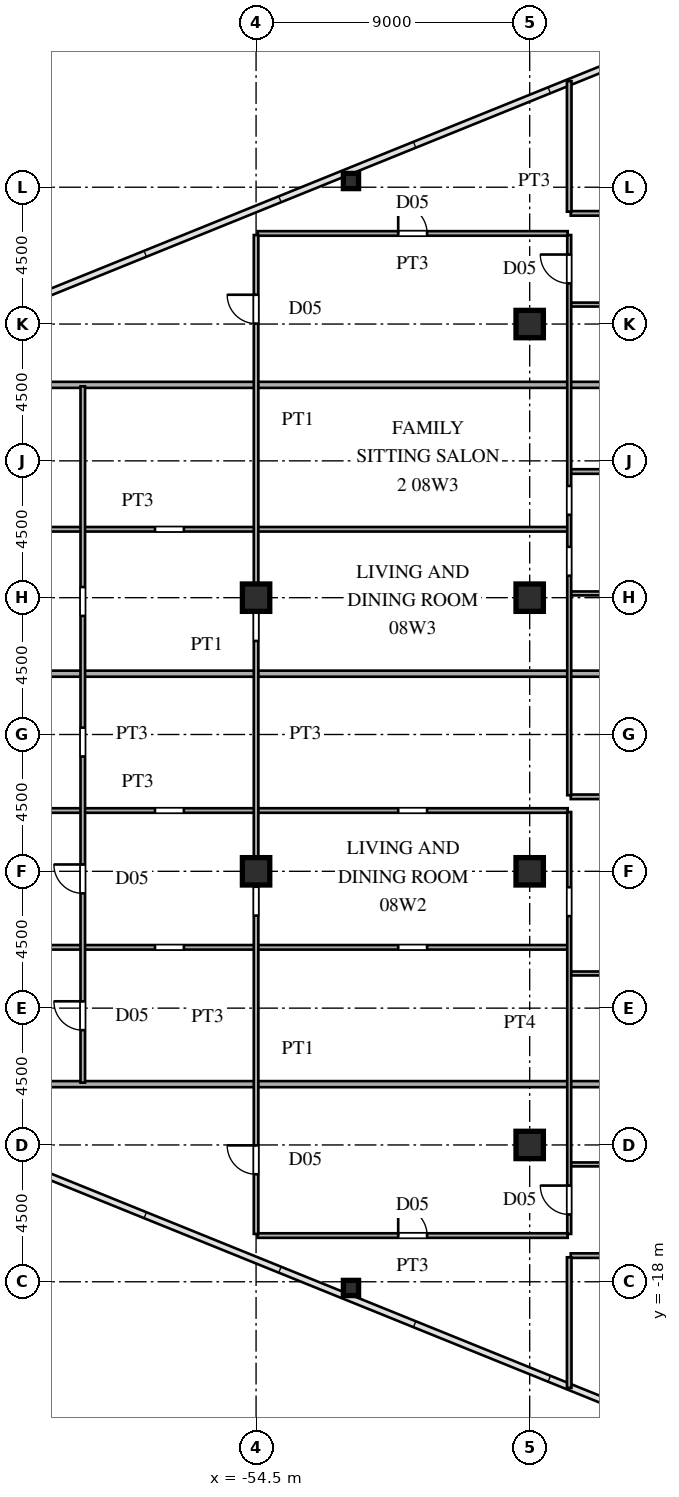
"""IFC4 building model, lengths in metres.
Left out: names, types, materials, properties, quantities, classifications, styles, units other than length and angle.
Written with IfcOpenShell. Run it as: python <this file> out.ifc"""

import sys

from ifc_helpers import new_model, si_unit, direction, frame, frame_2d, origin, origin_2d, place, context, subcontext, project, spatial, rectangle, hollow_rectangle, i_section, extrude, source, transform, mapped, element, fill, save


model = new_model("IFC4")
c1 = context("Model", 3, precision=1e-05, world=origin(), true_north=direction((0.0, 1.0)))
c2 = subcontext(c1, "Body", "Model", "MODEL_VIEW")
j1 = project(units=[si_unit("LENGTHUNIT", "METRE"), si_unit("PLANEANGLEUNIT", "RADIAN")], contexts=[c1])
p1 = place(None, origin())
s1 = spatial("IfcSite", under=j1, at=p1, CompositionType="ELEMENT")
p2 = place(p1, origin())
s2 = spatial("IfcBuilding", under=s1, at=p2, CompositionType="ELEMENT")
p3 = place(p2, frame((0.0, 0.0, 33.3)))
s3 = spatial("IfcBuildingStorey", under=s2, at=p3, CompositionType="ELEMENT", Elevation=33.3)
m1 = source(origin(), c2, "Body", "SweptSolid", [
    extrude(i_section(OverallWidth=0.9, OverallDepth=0.9, WebThickness=0.036, FlangeThickness=0.055, at=origin_2d()), origin(), (0.0, 0.0, 1.0), 3.6),
])
for number, where, z_axis, x_axis in (
    (1, (-45.5, -13.5, 0.0), (0.0, 0.0, 1.0), (1.0, 0.0, 0.0)),
    (2, (-45.5, -4.5, 0.0), (0.0, 0.0, 1.0), (1.0, 0.0, 0.0)),
    (3, (-45.5, 4.5, 0.0), (0.0, 0.0, 1.0), (1.0, 0.0, 0.0)),
    (4, (-45.5, 13.5, 0.0), (0.0, 0.0, 1.0), (1.0, 0.0, 0.0)),
    (5, (-54.5, -4.5, 0.0), (0.0, 0.0, 1.0), (1.0, 0.0, 0.0)),
    (6, (-54.5, 4.5, 0.0), (0.0, 0.0, 1.0), (1.0, 0.0, 0.0)),
):
    element("IfcColumn", number, at=place(p3, frame(where, z_axis=z_axis, x_axis=x_axis)), inside=s3, PredefinedType="COLUMN", context=c2, shape_type="MappedRepresentation", body=[
        mapped(m1, transform((0.0, 0.0, 0.0), scale=1.0)),
    ])
m2 = source(origin(), c2, "Body", "SweptSolid", [
    extrude(hollow_rectangle(XDim=0.5, YDim=0.5, WallThickness=0.02, at=origin_2d()), origin(), (0.0, 0.0, 1.0), 3.6),
])
for number, where, z_axis, x_axis in (
    (7, (-51.378, -18.204, 0.0), (0.0, 0.0, 1.0), (1.0, 0.0, 0.0)),
    (8, (-51.378, 18.204, 0.0), (0.0, 0.0, 1.0), (1.0, 0.0, 0.0)),
):
    element("IfcColumn", number, at=place(p3, frame(where, z_axis=z_axis, x_axis=x_axis)), inside=s3, PredefinedType="COLUMN", context=c2, shape_type="MappedRepresentation", body=[
        mapped(m2, transform((0.0, 0.0, 0.0), scale=1.0)),
    ])
p4 = place(p3, frame((-44.15, -17.14, 0.0), z_axis=(0.0, 0.0, 1.0), x_axis=(1.0, 0.0, 0.0)))
e9 = element("IfcWall", 9, at=p4, inside=s3, PredefinedType="PARTITIONING", context=c2, shape_type="SweptSolid", body=[
    extrude(rectangle(XDim=4.5, YDim=0.15, at=frame_2d((2.25, 0.0))), origin(), (0.0, 0.0, 1.0), 3.38),
])
p5 = place(p4, frame((1.775, 0.0, 0.0)))
e10 = element("IfcOpeningElement", 10, at=p5, cuts=e9, PredefinedType="OPENING", context=c2, shape_type="SweptSolid", body=[
    extrude(rectangle(XDim=0.95, YDim=2.15, at=frame_2d((0.475, 1.075))), frame((0.0, 0.085, 0.0), z_axis=(0.0, -1.0, 0.0), x_axis=(1.0, 0.0, 0.0)), (0.0, 0.0, 1.0), 0.17),
])
p6 = place(p3, frame((-54.45, -16.48, 0.0), z_axis=(0.0, 0.0, 1.0), x_axis=(1.0, 0.0, 0.0)))
e11 = element("IfcWall", 11, at=p6, inside=s3, PredefinedType="PARTITIONING", context=c2, shape_type="SweptSolid", body=[
    extrude(rectangle(XDim=10.2, YDim=0.15, at=frame_2d((5.1, 0.0))), origin(), (0.0, 0.0, 1.0), 3.38),
])
p7 = place(p6, frame((4.625, 0.0, 0.0)))
e12 = element("IfcOpeningElement", 12, at=p7, cuts=e11, PredefinedType="OPENING", context=c2, shape_type="SweptSolid", body=[
    extrude(rectangle(XDim=0.95, YDim=2.15, at=frame_2d((0.475, 1.075))), frame((0.0, 0.085, 0.0), z_axis=(0.0, -1.0, 0.0), x_axis=(1.0, 0.0, 0.0)), (0.0, 0.0, 1.0), 0.17),
])
p8 = place(p3, frame((-44.15, -14.14, 0.0), z_axis=(0.0, 0.0, 1.0), x_axis=(1.0, 0.0, 0.0)))
e13 = element("IfcWall", 13, at=p8, inside=s3, PredefinedType="PARTITIONING", context=c2, shape_type="SweptSolid", body=[
    extrude(rectangle(XDim=4.45, YDim=0.13, at=frame_2d((2.225, 0.0))), origin(), (0.0, 0.0, 1.0), 3.38),
])
p9 = place(p8, frame((1.785, 0.0, 0.0)))
e14 = element("IfcOpeningElement", 14, at=p9, cuts=e13, PredefinedType="OPENING", context=c2, shape_type="SweptSolid", body=[
    extrude(rectangle(XDim=0.88, YDim=2.1, at=frame_2d((0.44, 1.05))), frame((0.0, 0.075, 0.0), z_axis=(0.0, -1.0, 0.0), x_axis=(1.0, 0.0, 0.0)), (0.0, 0.0, 1.0), 0.15),
])
p10 = place(p3, frame((-68.807, -11.5, 0.0), z_axis=(0.0, 0.0, 1.0), x_axis=(1.0, 0.0, 0.0)))
e15 = element("IfcWall", 15, at=p10, inside=s3, PredefinedType="PARTITIONING", context=c2, shape_type="SweptSolid", body=[
    extrude(rectangle(XDim=29.077, YDim=0.2, at=frame_2d((14.539, 0.0))), origin(), (0.0, 0.0, 1.0), 3.38),
])
p11 = place(p3, frame((-44.15, -7.86, 0.0), z_axis=(0.0, 0.0, 1.0), x_axis=(1.0, 0.0, 0.0)))
e16 = element("IfcWall", 16, at=p11, inside=s3, PredefinedType="PARTITIONING", context=c2, shape_type="SweptSolid", body=[
    extrude(rectangle(XDim=4.45, YDim=0.13, at=frame_2d((2.225, 0.0))), origin(), (0.0, 0.0, 1.0), 3.38),
])
p12 = place(p11, frame((1.785, 0.0, 0.0)))
e17 = element("IfcOpeningElement", 17, at=p12, cuts=e16, PredefinedType="OPENING", context=c2, shape_type="SweptSolid", body=[
    extrude(rectangle(XDim=0.88, YDim=2.1, at=frame_2d((0.44, 1.05))), frame((0.0, 0.075, 0.0), z_axis=(0.0, -1.0, 0.0), x_axis=(1.0, 0.0, 0.0)), (0.0, 0.0, 1.0), 0.15),
])
p13 = place(p3, frame((-72.535, -7.0, 0.0), z_axis=(0.0, 0.0, 1.0), x_axis=(1.0, 0.0, 0.0)))
e18 = element("IfcWall", 18, at=p13, inside=s3, PredefinedType="PARTITIONING", context=c2, shape_type="SweptSolid", body=[
    extrude(rectangle(XDim=28.285, YDim=0.15, at=frame_2d((14.143, 0.0))), origin(), (0.0, 0.0, 1.0), 3.38),
])
p14 = place(p13, frame((22.71, 0.0, 0.0)))
e19 = element("IfcOpeningElement", 19, at=p14, cuts=e18, PredefinedType="OPENING", context=c2, shape_type="SweptSolid", body=[
    extrude(rectangle(XDim=0.95, YDim=2.15, at=frame_2d((0.475, 1.075))), frame((0.0, 0.085, 0.0), z_axis=(0.0, -1.0, 0.0), x_axis=(1.0, 0.0, 0.0)), (0.0, 0.0, 1.0), 0.17),
])
p15 = place(p13, frame((14.71, 0.0, 0.0)))
e20 = element("IfcOpeningElement", 20, at=p15, cuts=e18, PredefinedType="OPENING", context=c2, shape_type="SweptSolid", body=[
    extrude(rectangle(XDim=0.95, YDim=2.15, at=frame_2d((0.475, 1.075))), frame((0.0, 0.085, 0.0), z_axis=(0.0, -1.0, 0.0), x_axis=(1.0, 0.0, 0.0)), (0.0, 0.0, 1.0), 0.17),
])
p16 = place(p3, frame((-72.535, -2.5, 0.0), z_axis=(0.0, 0.0, 1.0), x_axis=(1.0, 0.0, 0.0)))
e21 = element("IfcWall", 21, at=p16, inside=s3, PredefinedType="PARTITIONING", context=c2, shape_type="SweptSolid", body=[
    extrude(rectangle(XDim=28.285, YDim=0.15, at=frame_2d((14.143, 0.0))), origin(), (0.0, 0.0, 1.0), 3.38),
])
p17 = place(p16, frame((22.71, 0.0, 0.0)))
e22 = element("IfcOpeningElement", 22, at=p17, cuts=e21, PredefinedType="OPENING", context=c2, shape_type="SweptSolid", body=[
    extrude(rectangle(XDim=0.95, YDim=2.15, at=frame_2d((0.475, 1.075))), frame((0.0, 0.085, 0.0), z_axis=(0.0, -1.0, 0.0), x_axis=(1.0, 0.0, 0.0)), (0.0, 0.0, 1.0), 0.17),
])
p18 = place(p16, frame((14.71, 0.0, 0.0)))
e23 = element("IfcOpeningElement", 23, at=p18, cuts=e21, PredefinedType="OPENING", context=c2, shape_type="SweptSolid", body=[
    extrude(rectangle(XDim=0.95, YDim=2.15, at=frame_2d((0.475, 1.075))), frame((0.0, 0.085, 0.0), z_axis=(0.0, -1.0, 0.0), x_axis=(1.0, 0.0, 0.0)), (0.0, 0.0, 1.0), 0.17),
])
p19 = place(p3, frame((-44.15, -2.05, 0.0), z_axis=(0.0, 0.0, 1.0), x_axis=(1.0, 0.0, 0.0)))
e24 = element("IfcWall", 24, at=p19, inside=s3, PredefinedType="PARTITIONING", context=c2, shape_type="SweptSolid", body=[
    extrude(rectangle(XDim=4.45, YDim=0.15, at=frame_2d((2.225, 0.0))), origin(), (0.0, 0.0, 1.0), 3.38),
])
p20 = place(p19, frame((1.75, 0.0, 0.0)))
e25 = element("IfcOpeningElement", 25, at=p20, cuts=e24, PredefinedType="OPENING", context=c2, shape_type="SweptSolid", body=[
    extrude(rectangle(XDim=0.95, YDim=2.15, at=frame_2d((0.475, 1.075))), frame((0.0, 0.085, 0.0), z_axis=(0.0, -1.0, 0.0), x_axis=(1.0, 0.0, 0.0)), (0.0, 0.0, 1.0), 0.17),
])
p21 = place(p3, frame((-72.505, 2.0, 0.0), z_axis=(0.0, 0.0, 1.0), x_axis=(1.0, 0.0, 0.0)))
e26 = element("IfcWall", 26, at=p21, inside=s3, PredefinedType="PARTITIONING", context=c2, shape_type="SweptSolid", body=[
    extrude(rectangle(XDim=32.775, YDim=0.2, at=frame_2d((16.387, 0.0))), origin(), (0.0, 0.0, 1.0), 3.38),
])
p22 = place(p3, frame((-44.15, 4.64, 0.0), z_axis=(0.0, 0.0, 1.0), x_axis=(1.0, 0.0, 0.0)))
e27 = element("IfcWall", 27, at=p22, inside=s3, PredefinedType="PARTITIONING", context=c2, shape_type="SweptSolid", body=[
    extrude(rectangle(XDim=4.45, YDim=0.13, at=frame_2d((2.225, 0.0))), origin(), (0.0, 0.0, 1.0), 2.68),
])
p23 = place(p22, frame((1.785, 0.0, 0.0)))
e28 = element("IfcOpeningElement", 28, at=p23, cuts=e27, PredefinedType="OPENING", context=c2, shape_type="SweptSolid", body=[
    extrude(rectangle(XDim=0.88, YDim=2.1, at=frame_2d((0.44, 1.05))), frame((0.0, 0.075, 0.0), z_axis=(0.0, -1.0, 0.0), x_axis=(1.0, 0.0, 0.0)), (0.0, 0.0, 1.0), 0.15),
])
p24 = place(p3, frame((-72.535, 6.75, 0.0), z_axis=(0.0, 0.0, 1.0), x_axis=(1.0, 0.0, 0.0)))
e29 = element("IfcWall", 29, at=p24, inside=s3, PredefinedType="PARTITIONING", context=c2, shape_type="SweptSolid", body=[
    extrude(rectangle(XDim=28.285, YDim=0.15, at=frame_2d((14.143, 0.0))), origin(), (0.0, 0.0, 1.0), 3.38),
])
p25 = place(p24, frame((5.71, 0.0, 0.0)))
e30 = element("IfcOpeningElement", 30, at=p25, cuts=e29, PredefinedType="OPENING", context=c2, shape_type="SweptSolid", body=[
    extrude(rectangle(XDim=0.95, YDim=2.15, at=frame_2d((0.475, 1.075))), frame((0.0, 0.085, 0.0), z_axis=(0.0, -1.0, 0.0), x_axis=(1.0, 0.0, 0.0)), (0.0, 0.0, 1.0), 0.17),
])
p26 = place(p24, frame((14.71, 0.0, 0.0)))
e31 = element("IfcOpeningElement", 31, at=p26, cuts=e29, PredefinedType="OPENING", context=c2, shape_type="SweptSolid", body=[
    extrude(rectangle(XDim=0.95, YDim=2.15, at=frame_2d((0.475, 1.075))), frame((0.0, 0.085, 0.0), z_axis=(0.0, -1.0, 0.0), x_axis=(1.0, 0.0, 0.0)), (0.0, 0.0, 1.0), 0.17),
])
p27 = place(p3, frame((-44.15, 8.65, 0.0), z_axis=(0.0, 0.0, 1.0), x_axis=(1.0, 0.0, 0.0)))
e32 = element("IfcWall", 32, at=p27, inside=s3, PredefinedType="PARTITIONING", context=c2, shape_type="SweptSolid", body=[
    extrude(rectangle(XDim=4.45, YDim=0.15, at=frame_2d((2.225, 0.0))), origin(), (0.0, 0.0, 1.0), 3.38),
])
p28 = place(p27, frame((1.75, 0.0, 0.0)))
e33 = element("IfcOpeningElement", 33, at=p28, cuts=e32, PredefinedType="OPENING", context=c2, shape_type="SweptSolid", body=[
    extrude(rectangle(XDim=0.95, YDim=2.15, at=frame_2d((0.475, 1.075))), frame((0.0, 0.085, 0.0), z_axis=(0.0, -1.0, 0.0), x_axis=(1.0, 0.0, 0.0)), (0.0, 0.0, 1.0), 0.17),
])
p29 = place(p3, frame((-68.807, 11.5, 0.0), z_axis=(0.0, 0.0, 1.0), x_axis=(1.0, 0.0, 0.0)))
e34 = element("IfcWall", 34, at=p29, inside=s3, PredefinedType="PARTITIONING", context=c2, shape_type="SweptSolid", body=[
    extrude(rectangle(XDim=29.077, YDim=0.2, at=frame_2d((14.539, 0.0))), origin(), (0.0, 0.0, 1.0), 3.38),
])
p30 = place(p3, frame((-44.15, 14.14, 0.0), z_axis=(0.0, 0.0, 1.0), x_axis=(1.0, 0.0, 0.0)))
e35 = element("IfcWall", 35, at=p30, inside=s3, PredefinedType="PARTITIONING", context=c2, shape_type="SweptSolid", body=[
    extrude(rectangle(XDim=4.45, YDim=0.13, at=frame_2d((2.225, 0.0))), origin(), (0.0, 0.0, 1.0), 3.38),
])
p31 = place(p30, frame((1.785, 0.0, 0.0)))
e36 = element("IfcOpeningElement", 36, at=p31, cuts=e35, PredefinedType="OPENING", context=c2, shape_type="SweptSolid", body=[
    extrude(rectangle(XDim=0.88, YDim=2.1, at=frame_2d((0.44, 1.05))), frame((0.0, 0.075, 0.0), z_axis=(0.0, -1.0, 0.0), x_axis=(1.0, 0.0, 0.0)), (0.0, 0.0, 1.0), 0.15),
])
p32 = place(p3, frame((-54.45, 16.48, 0.0), z_axis=(0.0, 0.0, 1.0), x_axis=(1.0, 0.0, 0.0)))
e37 = element("IfcWall", 37, at=p32, inside=s3, PredefinedType="PARTITIONING", context=c2, shape_type="SweptSolid", body=[
    extrude(rectangle(XDim=10.2, YDim=0.15, at=frame_2d((5.1, 0.0))), origin(), (0.0, 0.0, 1.0), 3.38),
])
p33 = place(p32, frame((4.625, 0.0, 0.0)))
e38 = element("IfcOpeningElement", 38, at=p33, cuts=e37, PredefinedType="OPENING", context=c2, shape_type="SweptSolid", body=[
    extrude(rectangle(XDim=0.95, YDim=2.15, at=frame_2d((0.475, 1.075))), frame((0.0, 0.085, 0.0), z_axis=(0.0, -1.0, 0.0), x_axis=(1.0, 0.0, 0.0)), (0.0, 0.0, 1.0), 0.17),
])
p34 = place(p3, frame((-44.15, 17.14, 0.0), z_axis=(0.0, 0.0, 1.0), x_axis=(1.0, 0.0, 0.0)))
e39 = element("IfcWall", 39, at=p34, inside=s3, PredefinedType="PARTITIONING", context=c2, shape_type="SweptSolid", body=[
    extrude(rectangle(XDim=4.5, YDim=0.15, at=frame_2d((2.25, 0.0))), origin(), (0.0, 0.0, 1.0), 3.38),
])
p35 = place(p34, frame((1.775, 0.0, 0.0)))
e40 = element("IfcOpeningElement", 40, at=p35, cuts=e39, PredefinedType="OPENING", context=c2, shape_type="SweptSolid", body=[
    extrude(rectangle(XDim=0.95, YDim=2.15, at=frame_2d((0.475, 1.075))), frame((0.0, 0.085, 0.0), z_axis=(0.0, -1.0, 0.0), x_axis=(1.0, 0.0, 0.0)), (0.0, 0.0, 1.0), 0.17),
])
p36 = place(p3, frame((-60.2, -11.45, 0.0), z_axis=(0.0, 0.0, 1.0), x_axis=(0.0, 1.0, 0.0)))
e41 = element("IfcWall", 41, at=p36, inside=s3, PredefinedType="PARTITIONING", context=c2, shape_type="SweptSolid", body=[
    extrude(rectangle(XDim=22.9, YDim=0.15, at=frame_2d((11.45, 0.0))), origin(), (0.0, 0.0, 1.0), 3.38),
])
p37 = place(p36, frame((1.725, 0.0, 0.0)))
e42 = element("IfcOpeningElement", 42, at=p37, cuts=e41, PredefinedType="OPENING", context=c2, shape_type="SweptSolid", body=[
    extrude(rectangle(XDim=0.95, YDim=2.15, at=frame_2d((0.475, 1.075))), frame((0.0, 0.085, 0.0), z_axis=(0.0, -1.0, 0.0), x_axis=(1.0, 0.0, 0.0)), (0.0, 0.0, 1.0), 0.17),
])
p38 = place(p36, frame((6.225, 0.0, 0.0)))
e43 = element("IfcOpeningElement", 43, at=p38, cuts=e41, PredefinedType="OPENING", context=c2, shape_type="SweptSolid", body=[
    extrude(rectangle(XDim=0.95, YDim=2.15, at=frame_2d((0.475, 1.075))), frame((0.0, 0.085, 0.0), z_axis=(0.0, -1.0, 0.0), x_axis=(1.0, 0.0, 0.0)), (0.0, 0.0, 1.0), 0.17),
])
p39 = place(p36, frame((10.725, 0.0, 0.0)))
e44 = element("IfcOpeningElement", 44, at=p39, cuts=e41, PredefinedType="OPENING", context=c2, shape_type="SweptSolid", body=[
    extrude(rectangle(XDim=0.95, YDim=2.15, at=frame_2d((0.475, 1.075))), frame((0.0, 0.085, 0.0), z_axis=(0.0, -1.0, 0.0), x_axis=(1.0, 0.0, 0.0)), (0.0, 0.0, 1.0), 0.17),
])
p40 = place(p36, frame((15.35, 0.0, 0.0)))
e45 = element("IfcOpeningElement", 45, at=p40, cuts=e41, PredefinedType="OPENING", context=c2, shape_type="SweptSolid", body=[
    extrude(rectangle(XDim=0.95, YDim=2.15, at=frame_2d((0.475, 1.075))), frame((0.0, 0.085, 0.0), z_axis=(0.0, -1.0, 0.0), x_axis=(1.0, 0.0, 0.0)), (0.0, 0.0, 1.0), 0.17),
])
p41 = place(p3, frame((-54.5, -16.427, 0.0), z_axis=(0.0, 0.0, 1.0), x_axis=(0.0, 1.0, 0.0)))
e46 = element("IfcWall", 46, at=p41, inside=s3, PredefinedType="PARTITIONING", context=c2, shape_type="SweptSolid", body=[
    extrude(rectangle(XDim=32.854, YDim=0.15, at=frame_2d((16.427, 0.0))), origin(), (0.0, 0.0, 1.0), 2.68),
])
p42 = place(p41, frame((1.963, 0.0, 0.0)))
e47 = element("IfcOpeningElement", 47, at=p42, cuts=e46, PredefinedType="OPENING", context=c2, shape_type="SweptSolid", body=[
    extrude(rectangle(XDim=0.95, YDim=2.15, at=frame_2d((0.475, 1.075))), frame((0.0, 0.085, 0.0), z_axis=(0.0, -1.0, 0.0), x_axis=(1.0, 0.0, 0.0)), (0.0, 0.0, 1.0), 0.17),
])
p43 = place(p41, frame((10.47, 0.0, 0.0)))
e48 = element("IfcOpeningElement", 48, at=p43, cuts=e46, PredefinedType="OPENING", context=c2, shape_type="SweptSolid", body=[
    extrude(rectangle(XDim=0.95, YDim=2.15, at=frame_2d((0.475, 1.075))), frame((0.0, 0.085, 0.0), z_axis=(0.0, -1.0, 0.0), x_axis=(1.0, 0.0, 0.0)), (0.0, 0.0, 1.0), 0.17),
])
p44 = place(p41, frame((19.504, 0.0, 0.0)))
e49 = element("IfcOpeningElement", 49, at=p44, cuts=e46, PredefinedType="OPENING", context=c2, shape_type="SweptSolid", body=[
    extrude(rectangle(XDim=0.95, YDim=2.15, at=frame_2d((0.475, 1.075))), frame((0.0, 0.085, 0.0), z_axis=(0.0, -1.0, 0.0), x_axis=(1.0, 0.0, 0.0)), (0.0, 0.0, 1.0), 0.17),
])
p45 = place(p41, frame((29.941, 0.0, 0.0)))
e50 = element("IfcOpeningElement", 50, at=p45, cuts=e46, PredefinedType="OPENING", context=c2, shape_type="SweptSolid", body=[
    extrude(rectangle(XDim=0.95, YDim=2.15, at=frame_2d((0.475, 1.075))), frame((0.0, 0.085, 0.0), z_axis=(0.0, -1.0, 0.0), x_axis=(1.0, 0.0, 0.0)), (0.0, 0.0, 1.0), 0.17),
])
p46 = place(p3, frame((-44.2, -21.49, 0.0), z_axis=(0.0, 0.0, 1.0), x_axis=(0.0, 1.0, 0.0)))
e51 = element("IfcWall", 51, at=p46, inside=s3, PredefinedType="PARTITIONING", context=c2, shape_type="SweptSolid", body=[
    extrude(rectangle(XDim=4.295, YDim=0.15, at=frame_2d((2.147, 0.0))), origin(), (0.0, 0.0, 1.0), 3.38),
])
p47 = place(p3, frame((-44.2, -16.427, 0.0), z_axis=(0.0, 0.0, 1.0), x_axis=(0.0, 1.0, 0.0)))
e52 = element("IfcWall", 52, at=p47, inside=s3, PredefinedType="PARTITIONING", context=c2, shape_type="SweptSolid", body=[
    extrude(rectangle(XDim=13.877, YDim=0.13, at=frame_2d((6.938, 0.0))), origin(), (0.0, 0.0, 1.0), 3.38),
])
p48 = place(p47, frame((0.641, 0.0, 0.0)))
e53 = element("IfcOpeningElement", 53, at=p48, cuts=e52, PredefinedType="OPENING", context=c2, shape_type="SweptSolid", body=[
    extrude(rectangle(XDim=0.95, YDim=2.15, at=frame_2d((0.475, 1.075))), frame((0.0, 0.075, 0.0), z_axis=(0.0, -1.0, 0.0), x_axis=(1.0, 0.0, 0.0)), (0.0, 0.0, 1.0), 0.15),
])
p49 = place(p47, frame((10.454, 0.0, 0.0)))
e54 = element("IfcOpeningElement", 54, at=p49, cuts=e52, PredefinedType="OPENING", context=c2, shape_type="SweptSolid", body=[
    extrude(rectangle(XDim=0.95, YDim=2.15, at=frame_2d((0.475, 1.075))), frame((0.0, 0.075, 0.0), z_axis=(0.0, -1.0, 0.0), x_axis=(1.0, 0.0, 0.0)), (0.0, 0.0, 1.0), 0.15),
])
p50 = place(p3, frame((-44.2, -1.998, 0.0), z_axis=(0.0, 0.0, 1.0), x_axis=(0.0, 1.0, 0.0)))
e55 = element("IfcWall", 55, at=p50, inside=s3, PredefinedType="PARTITIONING", context=c2, shape_type="SweptSolid", body=[
    extrude(rectangle(XDim=18.425, YDim=0.13, at=frame_2d((9.212, 0.0))), origin(), (0.0, 0.0, 1.0), 3.38),
])
p51 = place(p50, frame((7.22, 0.0, 0.0)))
e56 = element("IfcOpeningElement", 56, at=p51, cuts=e55, PredefinedType="OPENING", context=c2, shape_type="SweptSolid", body=[
    extrude(rectangle(XDim=0.95, YDim=2.15, at=frame_2d((0.475, 1.075))), frame((0.0, 0.075, 0.0), z_axis=(0.0, -1.0, 0.0), x_axis=(1.0, 0.0, 0.0)), (0.0, 0.0, 1.0), 0.15),
])
p52 = place(p50, frame((9.224, 0.0, 0.0)))
e57 = element("IfcOpeningElement", 57, at=p52, cuts=e55, PredefinedType="OPENING", context=c2, shape_type="SweptSolid", body=[
    extrude(rectangle(XDim=0.95, YDim=2.15, at=frame_2d((0.475, 1.075))), frame((0.0, 0.075, 0.0), z_axis=(0.0, -1.0, 0.0), x_axis=(1.0, 0.0, 0.0)), (0.0, 0.0, 1.0), 0.15),
])
p53 = place(p50, frame((16.834, 0.0, 0.0)))
e58 = element("IfcOpeningElement", 58, at=p53, cuts=e55, PredefinedType="OPENING", context=c2, shape_type="SweptSolid", body=[
    extrude(rectangle(XDim=0.95, YDim=2.15, at=frame_2d((0.475, 1.075))), frame((0.0, 0.075, 0.0), z_axis=(0.0, -1.0, 0.0), x_axis=(1.0, 0.0, 0.0)), (0.0, 0.0, 1.0), 0.15),
])
p54 = place(p3, frame((-44.2, 17.195, 0.0), z_axis=(0.0, 0.0, 1.0), x_axis=(0.0, 1.0, 0.0)))
e59 = element("IfcWall", 59, at=p54, inside=s3, PredefinedType="PARTITIONING", context=c2, shape_type="SweptSolid", body=[
    extrude(rectangle(XDim=4.295, YDim=0.15, at=frame_2d((2.147, 0.0))), origin(), (0.0, 0.0, 1.0), 3.38),
])
m3 = source(origin(), c2, "Body", "SweptSolid", [
    extrude(rectangle(XDim=0.95, YDim=2.15, at=frame_2d((0.475, 1.075))), frame((0.0, 0.025, 0.0), z_axis=(0.0, -1.0, 0.0), x_axis=(1.0, 0.0, 0.0)), (0.0, 0.0, 1.0), 0.05),
])
p55 = place(p7, origin())
e60 = element("IfcDoor", 60, at=p55, inside=s3, OperationType="SINGLE_SWING_LEFT", PredefinedType="DOOR", context=c2, shape_type="MappedRepresentation", body=[
    mapped(m3, transform((0.0, 0.0, 0.0), scale=1.0)),
])
fill(e12, e60)
p56 = place(p33, origin())
e61 = element("IfcDoor", 61, at=p56, inside=s3, OperationType="SINGLE_SWING_LEFT", PredefinedType="DOOR", context=c2, shape_type="MappedRepresentation", body=[
    mapped(m3, transform((0.0, 0.0, 0.0), scale=1.0)),
])
fill(e38, e61)
p57 = place(p37, origin())
e62 = element("IfcDoor", 62, at=p57, inside=s3, OperationType="SINGLE_SWING_RIGHT", PredefinedType="DOOR", context=c2, shape_type="MappedRepresentation", body=[
    mapped(m3, transform((0.0, 0.0, 0.0), scale=1.0)),
])
fill(e42, e62)
p58 = place(p38, origin())
e63 = element("IfcDoor", 63, at=p58, inside=s3, OperationType="SINGLE_SWING_RIGHT", PredefinedType="DOOR", context=c2, shape_type="MappedRepresentation", body=[
    mapped(m3, transform((0.0, 0.0, 0.0), scale=1.0)),
])
fill(e43, e63)
p59 = place(p42, origin())
e64 = element("IfcDoor", 64, at=p59, inside=s3, OperationType="SINGLE_SWING_RIGHT", PredefinedType="DOOR", context=c2, shape_type="MappedRepresentation", body=[
    mapped(m3, transform((0.0, 0.0, 0.0), scale=1.0)),
])
fill(e47, e64)
p60 = place(p45, origin())
e65 = element("IfcDoor", 65, at=p60, inside=s3, OperationType="SINGLE_SWING_RIGHT", PredefinedType="DOOR", context=c2, shape_type="MappedRepresentation", body=[
    mapped(m3, transform((0.0, 0.0, 0.0), scale=1.0)),
])
fill(e50, e65)
p61 = place(p48, origin())
e66 = element("IfcDoor", 66, at=p61, inside=s3, OperationType="SINGLE_SWING_RIGHT", PredefinedType="DOOR", context=c2, shape_type="MappedRepresentation", body=[
    mapped(m3, transform((0.0, 0.0, 0.0), scale=1.0)),
])
fill(e53, e66)
p62 = place(p53, origin())
e67 = element("IfcDoor", 67, at=p62, inside=s3, OperationType="SINGLE_SWING_RIGHT", PredefinedType="DOOR", context=c2, shape_type="MappedRepresentation", body=[
    mapped(m3, transform((0.0, 0.0, 0.0), scale=1.0)),
])
fill(e58, e67)
save(model, sys.argv[1])
